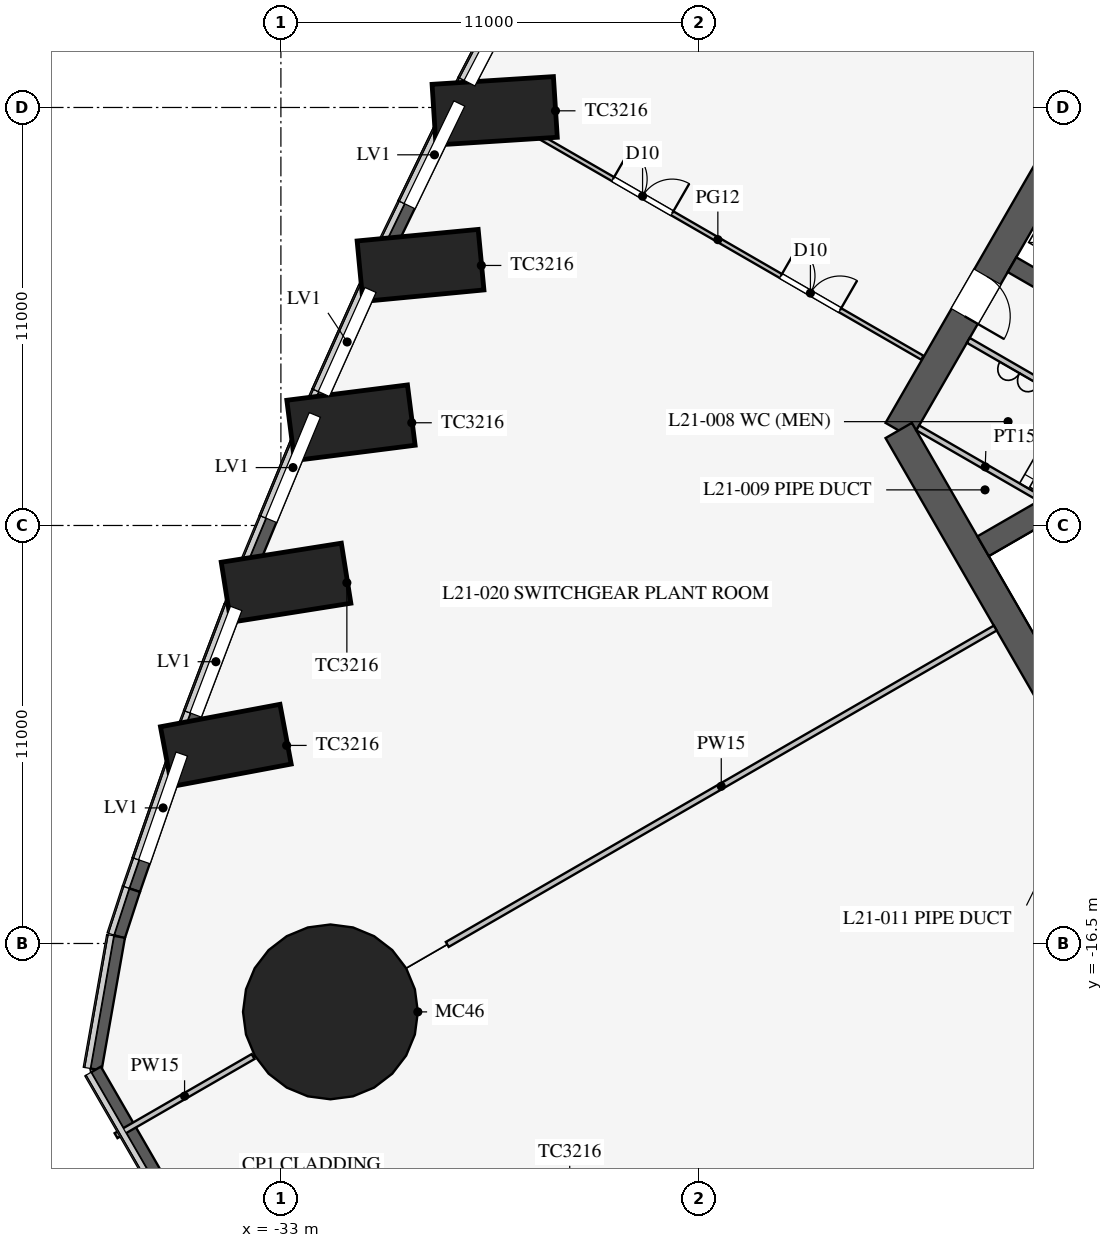
"""IFC4 building model, lengths in metres.
Left out: names, types, materials, properties, quantities, classifications, styles, units other than length and angle.
Written with IfcOpenShell. Run it as: python <this file> out.ifc"""

import sys

from ifc_helpers import new_model, si_unit, direction, frame, frame_2d, origin, origin_2d, place, context, subcontext, project, spatial, polyline, rectangle, circle, outline, extrude, clip, halfspace, element, fill, save


model = new_model("IFC4")
c1 = context("Model", 3, precision=1e-05, world=origin(), true_north=direction((0.0, 1.0)))
c2 = subcontext(c1, "Body", "Model", "MODEL_VIEW")
j1 = project(units=[si_unit("LENGTHUNIT", "METRE"), si_unit("PLANEANGLEUNIT", "RADIAN")], contexts=[c1])
p1 = place(None, origin())
s1 = spatial("IfcSite", under=j1, at=p1, CompositionType="ELEMENT")
p2 = place(p1, origin())
s2 = spatial("IfcBuilding", under=s1, at=p2, CompositionType="ELEMENT")
p3 = place(p2, frame((0.0, 0.0, 92.1)))
s3 = spatial("IfcBuildingStorey", under=s2, at=p3, CompositionType="ELEMENT", Elevation=92.1)
p4 = place(p3, frame((-27.0, -24.568, 0.0), z_axis=(0.0, 0.30053695487, 0.953770170826), x_axis=(0.982838110914, -0.175942156194, 0.055440106509)))
e1 = element("IfcColumn", 1, at=p4, inside=s3, PredefinedType="COLUMN", context=c2, shape_type="Clipping", body=[
    clip(clip(extrude(rectangle(XDim=3.2, YDim=1.6, at=origin_2d()), origin(), (0.0, 0.0, 1.0), 6.291), halfspace(frame((0.0, 0.0, 0.342), z_axis=(-3.2847543766298393e-06, 1.7500832742156636e-05, 0.9999999998414657), x_axis=(0.0, 0.9999999998468605, -1.750083274225105e-05)), True)), halfspace(frame((0.0, 0.0, 5.949), z_axis=(3.2847543766298393e-06, -1.7500832742156636e-05, -0.9999999998414657), x_axis=(0.0, -0.9999999998468605, 1.750083274225105e-05)), True)),
])
p5 = place(p3, frame((-27.611, 5.549, 0.0), z_axis=(0.191886340443, -0.110783015409, 0.975144479474), x_axis=(-0.445390477365, -0.895226011395, -0.014060981253)))
e2 = element("IfcColumn", 2, at=p5, inside=s3, PredefinedType="COLUMN", context=c2, shape_type="Clipping", body=[
    clip(clip(extrude(rectangle(XDim=3.2, YDim=1.6, at=origin_2d()), origin(), (0.0, 0.0, 1.0), 6.153), halfspace(frame((0.0, 0.0, 0.205), z_axis=(8.069350751413462e-07, -2.2984768012629386e-05, 0.9999999997355247), x_axis=(0.0, 0.9999999997358503, 2.298476801263687e-05)), True)), halfspace(frame((0.0, 0.0, 5.947), z_axis=(-8.069350751413462e-07, 2.2984768012629386e-05, -0.9999999997355247), x_axis=(0.0, -0.9999999997358503, -2.298476801263687e-05)), True)),
])
p6 = place(p3, frame((-29.576, 1.487, 0.0), z_axis=(0.20262976704, -0.116980910023, 0.972243099332), x_axis=(-0.417791222298, -0.908271551682, -0.022209974679)))
e3 = element("IfcColumn", 3, at=p6, inside=s3, PredefinedType="COLUMN", context=c2, shape_type="Clipping", body=[
    clip(clip(extrude(rectangle(XDim=3.2, YDim=1.6, at=origin_2d()), origin(), (0.0, 0.0, 1.0), 6.171), halfspace(frame((-0.0, 0.0, 0.229), z_axis=(6.181182433073058e-06, -3.065069579338831e-06, 0.9999999999761991), x_axis=(0.0, 0.9999999999953028, 3.0650695793973846e-06)), True)), halfspace(frame((0.0, 0.0, 5.942), z_axis=(-6.181182433073058e-06, 3.065069579338831e-06, -0.9999999999761991), x_axis=(0.0, -0.9999999999953028, -3.0650695793973846e-06)), True)),
])
p7 = place(p3, frame((-31.426, -2.641, 0.0), z_axis=(0.217636836674, -0.125674836379, 0.967904976133), x_axis=(-0.390430392584, -0.920087338943, -0.031676446499)))
e4 = element("IfcColumn", 4, at=p7, inside=s3, PredefinedType="COLUMN", context=c2, shape_type="Clipping", body=[
    clip(clip(extrude(rectangle(XDim=3.2, YDim=1.6, at=origin_2d()), origin(), (0.0, 0.0, 1.0), 6.199), halfspace(frame((0.0, 0.0, 0.259), z_axis=(-1.6119245002534085e-05, 2.5335897412520618e-05, 0.9999999995491311), x_axis=(0.0, 0.9999999996790462, -2.5335897415812134e-05)), True)), halfspace(frame((0.0, 0.0, 5.939), z_axis=(1.6119245002534085e-05, -2.5335897412520618e-05, -0.9999999995491311), x_axis=(0.0, -0.9999999996790462, 2.5335897415812134e-05)), True)),
])
p8 = place(p3, frame((-33.16, -6.836, 0.0), z_axis=(0.236939319597, -0.136786078955, 0.961846831586), x_axis=(-0.363310131171, -0.930682021103, -0.042857020249)))
e5 = element("IfcColumn", 5, at=p8, inside=s3, PredefinedType="COLUMN", context=c2, shape_type="Clipping", body=[
    clip(clip(extrude(rectangle(XDim=3.2, YDim=1.6, at=origin_2d()), origin(), (0.0, 0.0, 1.0), 6.238), halfspace(frame((0.0, 0.0, 0.297), z_axis=(1.1830986778905983e-05, 1.4324303993784593e-05, 0.9999999998274212), x_axis=(0.0, 0.9999999998974072, -1.4324303994787094e-05)), True)), halfspace(frame((0.0, 0.0, 5.941), z_axis=(-1.1830986778905983e-05, -1.4324303993784593e-05, -0.9999999998274212), x_axis=(0.0, -0.9999999998974072, 1.4324303994787094e-05)), True)),
])
p9 = place(p3, frame((-34.776, -11.099, 0.0), z_axis=(0.260253003307, -0.150307169968, 0.953769431742), x_axis=(-0.339184179186, -0.939084894567, -0.055440539186)))
e6 = element("IfcColumn", 6, at=p9, inside=s3, PredefinedType="COLUMN", context=c2, shape_type="Clipping", body=[
    clip(clip(extrude(rectangle(XDim=3.2, YDim=1.6, at=origin_2d()), origin(), (0.0, 0.0, 1.0), 6.291), halfspace(frame((0.0, 0.0, 0.342), z_axis=(-3.97536991854075e-05, 2.3073170005383226e-05, 0.9999999989436362), x_axis=(0.0, 0.9999999997338145, -2.3073170023615142e-05)), True)), halfspace(frame((-0.0, 0.0, 5.949), z_axis=(3.97536991854075e-05, -2.3073170005383226e-05, -0.9999999989436362), x_axis=(0.0, -0.9999999997338145, 2.3073170023615142e-05)), True)),
])
p10 = place(p3, frame((-32.043, -18.5, 0.0), z_axis=(0.273879842323, 0.158113013975, 0.948678083852), x_axis=(-0.499972520799, 0.866041268327, 0.0)))
e7 = element("IfcColumn", 7, at=p10, inside=s3, PredefinedType="COLUMN", context=c2, shape_type="Clipping", body=[
    clip(clip(extrude(circle(Radius=2.3, at=origin_2d()), origin(), (0.0, 0.0, 1.0), 6.325), halfspace(frame((0.0, 0.0, 0.768), z_axis=(1.0033762616878938e-05, 1.6488271940395816e-05, 0.9999999998137303), x_axis=(0.0, 0.9999999998640685, -1.6488271941225806e-05)), True)), halfspace(frame((0.0, 0.0, 5.557), z_axis=(-1.0033762616878938e-05, -1.6488271940395816e-05, -0.9999999998137303), x_axis=(0.0, -0.9999999998640685, 1.6488271941225806e-05)), True)),
])
p11 = place(p3, frame((-5.773, 16.0, 0.0), z_axis=(0.0, 0.0, 1.0), x_axis=(-0.500002442456, -0.866023993627, 0.0)))
e8 = element("IfcWall", 8, at=p11, inside=s3, PredefinedType="SHEAR", context=c2, shape_type="SweptSolid", body=[
    extrude(rectangle(XDim=21.939, YDim=0.8, at=frame_2d((10.97, 0.0))), origin(), (0.0, 0.0, 1.0), 6.0),
])
p12 = place(p11, frame((17.27, 0.0, 0.0)))
e9 = element("IfcOpeningElement", 9, at=p12, cuts=e8, PredefinedType="OPENING", context=c2, shape_type="SweptSolid", body=[
    extrude(rectangle(XDim=1.2, YDim=2.1, at=frame_2d((0.6, 1.05))), frame((0.0, 0.41, 0.0), z_axis=(0.0, -1.0, 0.0), x_axis=(1.0, 0.0, 0.0)), (0.0, 0.0, 1.0), 0.82),
])
p13 = place(p11, frame((3.47, 0.0, 0.0)))
e10 = element("IfcOpeningElement", 10, at=p13, cuts=e8, PredefinedType="OPENING", context=c2, shape_type="SweptSolid", body=[
    extrude(rectangle(XDim=1.2, YDim=2.1, at=frame_2d((0.6, 1.05))), frame((0.0, 0.41, 0.0), z_axis=(0.0, -1.0, 0.0), x_axis=(1.0, 0.0, 0.0)), (0.0, 0.0, 1.0), 0.82),
])
p14 = place(p3, frame((-16.743, -3.0, 0.0), z_axis=(0.0, 0.0, 1.0), x_axis=(0.499995765644, -0.866027848477, 0.0)))
e11 = element("IfcWall", 11, at=p14, inside=s3, PredefinedType="SHEAR", context=c2, shape_type="SweptSolid", body=[
    extrude(rectangle(XDim=11.547, YDim=0.8, at=frame_2d((5.773, 0.0))), origin(), (0.0, 0.0, 1.0), 6.0),
])
p15 = place(p3, frame((-11.532, 0.076, 0.0), z_axis=(0.0, 0.0, 1.0), x_axis=(-0.866005588531, 0.500034319456, 0.0)))
e12 = element("IfcWall", 12, at=p15, inside=s3, PredefinedType="SHEAR", context=c2, shape_type="SweptSolid", body=[
    extrude(rectangle(XDim=2.575, YDim=0.45, at=frame_2d((1.288, 0.0))), origin(), (0.0, 0.0, 1.0), 6.0),
])
p16 = place(p3, frame((-6.663, -1.509, 0.0), z_axis=(0.0, 0.0, 1.0), x_axis=(-0.866019375473, -0.500010441196, 0.0)))
e13 = element("IfcWall", 13, at=p16, inside=s3, PredefinedType="SHEAR", context=c2, shape_type="SweptSolid", body=[
    extrude(rectangle(XDim=9.075, YDim=0.6, at=frame_2d((4.538, 0.0))), origin(), (0.0, 0.0, 1.0), 6.0),
])
p17 = place(p3, frame((-26.095, 9.87, 0.0), z_axis=(0.0, 0.0, 1.0), x_axis=(-0.461810056307, -0.886978845235, 0.0)))
e14 = element("IfcWall", 14, at=p17, inside=s3, PredefinedType="SOLIDWALL", context=c2, shape_type="SweptSolid", body=[
    extrude(rectangle(XDim=4.504, YDim=0.3, at=frame_2d((2.252, 0.0))), origin(), (0.0, 0.0, 1.0), 5.8),
])
p18 = place(p17, frame((1.204, 0.0, 3.5)))
e15 = element("IfcOpeningElement", 15, at=p18, cuts=e14, PredefinedType="OPENING", context=c2, shape_type="SweptSolid", body=[
    extrude(rectangle(XDim=3.0, YDim=2.0, at=frame_2d((1.5, 1.0))), frame((0.0, 0.16, 0.0), z_axis=(0.0, -1.0, 0.0), x_axis=(1.0, 0.0, 0.0)), (0.0, 0.0, 1.0), 0.32),
])
p19 = place(p3, frame((-28.175, 5.875, 0.0), z_axis=(0.0, 0.0, 1.0), x_axis=(-0.435857917556, -0.900015486369, 0.0)))
e16 = element("IfcWall", 16, at=p19, inside=s3, PredefinedType="SOLIDWALL", context=c2, shape_type="SweptSolid", body=[
    extrude(rectangle(XDim=4.512, YDim=0.3, at=frame_2d((2.256, 0.0))), origin(), (0.0, 0.0, 1.0), 5.8),
])
p20 = place(p19, frame((0.3, 0.0, 3.5)))
e17 = element("IfcOpeningElement", 17, at=p20, cuts=e16, PredefinedType="OPENING", context=c2, shape_type="SweptSolid", body=[
    extrude(rectangle(XDim=3.0, YDim=2.0, at=frame_2d((1.5, 1.0))), frame((0.0, 0.16, 0.0), z_axis=(0.0, -1.0, 0.0), x_axis=(1.0, 0.0, 0.0)), (0.0, 0.0, 1.0), 0.32),
])
p21 = place(p3, frame((-30.141, 1.814, 0.0), z_axis=(0.0, 0.0, 1.0), x_axis=(-0.409430894151, -0.912341132973, 0.0)))
e18 = element("IfcWall", 18, at=p21, inside=s3, PredefinedType="SOLIDWALL", context=c2, shape_type="SweptSolid", body=[
    extrude(rectangle(XDim=4.523, YDim=0.3, at=frame_2d((2.262, 0.0))), origin(), (0.0, 0.0, 1.0), 5.8),
])
p22 = place(p21, frame((1.223, 0.0, 3.5)))
e19 = element("IfcOpeningElement", 19, at=p22, cuts=e18, PredefinedType="OPENING", context=c2, shape_type="SweptSolid", body=[
    extrude(rectangle(XDim=3.0, YDim=2.0, at=frame_2d((1.5, 1.0))), frame((0.0, 0.16, 0.0), z_axis=(0.0, -1.0, 0.0), x_axis=(1.0, 0.0, 0.0)), (0.0, 0.0, 1.0), 0.32),
])
p23 = place(p3, frame((-31.993, -2.313, 0.0), z_axis=(0.0, 0.0, 1.0), x_axis=(-0.38265900014, -0.923889652292, 0.0)))
e20 = element("IfcWall", 20, at=p23, inside=s3, PredefinedType="SOLIDWALL", context=c2, shape_type="SweptSolid", body=[
    extrude(rectangle(XDim=4.539, YDim=0.3, at=frame_2d((2.27, 0.0))), origin(), (0.0, 0.0, 1.0), 5.8),
])
p24 = place(p23, frame((0.3, 0.0, 3.5)))
e21 = element("IfcOpeningElement", 21, at=p24, cuts=e20, PredefinedType="OPENING", context=c2, shape_type="SweptSolid", body=[
    extrude(rectangle(XDim=3.0, YDim=2.0, at=frame_2d((1.5, 1.0))), frame((0.0, 0.16, 0.0), z_axis=(0.0, -1.0, 0.0), x_axis=(1.0, 0.0, 0.0)), (0.0, 0.0, 1.0), 0.32),
])
p25 = place(p3, frame((-33.73, -6.507, 0.0), z_axis=(0.0, 0.0, 1.0), x_axis=(-0.355351603025, -0.93473270951, 0.0)))
e22 = element("IfcWall", 22, at=p25, inside=s3, PredefinedType="SOLIDWALL", context=c2, shape_type="SweptSolid", body=[
    extrude(rectangle(XDim=4.559, YDim=0.3, at=frame_2d((2.279, 0.0))), origin(), (0.0, 0.0, 1.0), 5.8),
])
p26 = place(p25, frame((1.259, 0.0, 3.5)))
e23 = element("IfcOpeningElement", 23, at=p26, cuts=e22, PredefinedType="OPENING", context=c2, shape_type="SweptSolid", body=[
    extrude(rectangle(XDim=3.0, YDim=2.0, at=frame_2d((1.5, 1.0))), frame((0.0, 0.16, 0.0), z_axis=(0.0, -1.0, 0.0), x_axis=(1.0, 0.0, 0.0)), (0.0, 0.0, 1.0), 0.32),
])
p27 = place(p3, frame((-35.35, -10.768, 0.0), z_axis=(0.0, 0.0, 1.0), x_axis=(-0.327681468309, -0.94478825952, 0.0)))
e24 = element("IfcWall", 24, at=p27, inside=s3, PredefinedType="SOLIDWALL", context=c2, shape_type="SweptSolid", body=[
    extrude(rectangle(XDim=4.582, YDim=0.3, at=frame_2d((2.291, 0.0))), origin(), (0.0, 0.0, 1.0), 5.8),
])
p28 = place(p27, frame((0.791, 0.0, 3.5)))
e25 = element("IfcOpeningElement", 25, at=p28, cuts=e24, PredefinedType="OPENING", context=c2, shape_type="SweptSolid", body=[
    extrude(rectangle(XDim=3.0, YDim=2.0, at=frame_2d((1.5, 1.0))), frame((0.0, 0.16, 0.0), z_axis=(0.0, -1.0, 0.0), x_axis=(1.0, 0.0, 0.0)), (0.0, 0.0, 1.0), 0.32),
])
p29 = place(p3, frame((-36.852, -15.097, 0.0), z_axis=(0.0, 0.0, 1.0), x_axis=(-0.309693449929, -0.950836456532, 0.0)))
e26 = element("IfcWall", 26, at=p29, inside=s3, PredefinedType="SOLIDWALL", context=c2, shape_type="SweptSolid", body=[
    extrude(rectangle(XDim=1.291, YDim=0.3, at=frame_2d((0.645, 0.0))), origin(), (0.0, 0.0, 1.0), 5.8),
])
for number, where, z_axis, x_axis in (
    (27, (-37.251, -16.324, 0.0), (0.0, 0.0, 1.0), (-0.174, -0.985, 0.0)),
    (28, (-37.867, -19.815, 0.0), (0.0, 0.0, 1.0), (0.5, -0.866, 0.0)),
):
    element("IfcWall", number, at=place(p3, frame(where, z_axis=z_axis, x_axis=x_axis)), inside=s3, PredefinedType="SOLIDWALL", context=c2, shape_type="SweptSolid", body=[
        extrude(rectangle(XDim=3.546, YDim=0.3, at=frame_2d((1.773, 0.0))), origin(), (0.0, 0.0, 1.0), 5.8),
    ])
p30 = place(p3, frame((-10.495, -3.178, 0.0), z_axis=(0.0, 0.0, 1.0), x_axis=(-0.86602216432, 0.500005610874, 0.0)))
e29 = element("IfcWall", 29, at=p30, inside=s3, PredefinedType="PARTITIONING", context=c2, shape_type="SweptSolid", body=[
    extrude(rectangle(XDim=5.1, YDim=0.15, at=frame_2d((2.55, 0.0))), origin(), (0.0, 0.0, 1.0), 5.8),
])
p31 = place(p30, frame((1.3, 0.0, 0.0)))
e30 = element("IfcOpeningElement", 30, at=p31, cuts=e29, PredefinedType="OPENING", context=c2, shape_type="SweptSolid", body=[
    extrude(rectangle(XDim=0.9, YDim=2.1, at=frame_2d((0.45, 1.05))), frame((0.0, 0.085, 0.0), z_axis=(0.0, -1.0, 0.0), x_axis=(1.0, 0.0, 0.0)), (0.0, 0.0, 1.0), 0.17),
])
p32 = place(p3, frame((-12.691, -4.982, 0.0), z_axis=(0.0, 0.0, 1.0), x_axis=(-0.8660249478, 0.500000789788, 0.0)))
e31 = element("IfcWall", 31, at=p32, inside=s3, PredefinedType="PARTITIONING", context=c2, shape_type="SweptSolid", body=[
    extrude(rectangle(XDim=4.1, YDim=0.15, at=frame_2d((2.05, 0.0))), origin(), (0.0, 0.0, 1.0), 5.8),
])
p33 = place(p3, frame((-14.203, -8.2, 0.0), z_axis=(0.0, 0.0, 1.0), x_axis=(-0.866024668836, -0.500001272966, 0.0)))
e32 = element("IfcWall", 32, at=p33, inside=s3, PredefinedType="PARTITIONING", context=c2, shape_type="SweptSolid", body=[
    extrude(rectangle(XDim=16.65, YDim=0.15, at=frame_2d((8.325, 0.0))), origin(), (0.0, 0.0, 1.0), 4.1),
])
p34 = place(p3, frame((-33.732, -19.475, 0.0), z_axis=(0.0, 0.0, 1.0), x_axis=(-0.866026440262, -0.499998204763, 0.0)))
e33 = element("IfcWall", 33, at=p34, inside=s3, PredefinedType="PARTITIONING", context=c2, shape_type="SweptSolid", body=[
    extrude(rectangle(XDim=4.164, YDim=0.15, at=frame_2d((2.082, 0.0))), origin(), (0.0, 0.0, 1.0), 4.1),
])
p35 = place(p3, frame((-26.316, 4.802, 0.0), z_axis=(0.0, 0.0, 1.0), x_axis=(-0.866073599808, 0.499916512745, 0.0)))
e34 = element("IfcWall", 34, at=p35, inside=s3, PredefinedType="PARTITIONING", context=c2, shape_type="SweptSolid", body=[
    extrude(outline(polyline([(0.0, 0.0), (0.653, 0.0), (0.653, 0.05), (0.0, 2.9), (0.0, 0.0)])), frame((0.0, 0.06, 0.0), z_axis=(0.0, -1.0, 0.0), x_axis=(1.0, 0.0, 0.0)), (0.0, 0.0, 1.0), 0.12),
])
p36 = place(p3, frame((-16.122, -1.084, 0.0), z_axis=(0.0, 0.0, 1.0), x_axis=(-0.866023947468, 0.500002522405, 0.0)))
e35 = element("IfcWall", 35, at=p36, inside=s3, PredefinedType="PARTITIONING", context=c2, shape_type="SweptSolid", body=[
    extrude(rectangle(XDim=11.771, YDim=0.12, at=frame_2d((5.886, 0.0))), origin(), (0.0, 0.0, 1.0), 2.9),
])
p37 = place(p36, frame((2.5, 0.0, 0.0)))
e36 = element("IfcOpeningElement", 36, at=p37, cuts=e35, PredefinedType="OPENING", context=c2, shape_type="SweptSolid", body=[
    extrude(rectangle(XDim=1.8, YDim=2.1, at=frame_2d((0.9, 1.05))), frame((0.0, 0.07, 0.0), z_axis=(0.0, -1.0, 0.0), x_axis=(1.0, 0.0, 0.0)), (0.0, 0.0, 1.0), 0.14),
])
p38 = place(p36, frame((7.6, 0.0, 0.0)))
e37 = element("IfcOpeningElement", 37, at=p38, cuts=e35, PredefinedType="OPENING", context=c2, shape_type="SweptSolid", body=[
    extrude(rectangle(XDim=1.8, YDim=2.1, at=frame_2d((0.9, 1.05))), frame((0.0, 0.07, 0.0), z_axis=(0.0, -1.0, 0.0), x_axis=(1.0, 0.0, 0.0)), (0.0, 0.0, 1.0), 0.14),
])
p39 = place(p18, origin())
e38 = element("IfcWindow", 38, at=p39, inside=s3, PartitioningType="SINGLE_PANEL", PredefinedType="USERDEFINED", context=c2, shape_type="SweptSolid", body=[
    extrude(rectangle(XDim=3.0, YDim=2.0, at=frame_2d((1.5, 1.0))), frame((0.0, 0.03, 0.0), z_axis=(0.0, -1.0, 0.0), x_axis=(1.0, 0.0, 0.0)), (0.0, 0.0, 1.0), 0.06),
])
fill(e15, e38)
p40 = place(p20, origin())
e39 = element("IfcWindow", 39, at=p40, inside=s3, PartitioningType="SINGLE_PANEL", PredefinedType="USERDEFINED", context=c2, shape_type="SweptSolid", body=[
    extrude(rectangle(XDim=3.0, YDim=2.0, at=frame_2d((1.5, 1.0))), frame((0.0, 0.03, 0.0), z_axis=(0.0, -1.0, 0.0), x_axis=(1.0, 0.0, 0.0)), (0.0, 0.0, 1.0), 0.06),
])
fill(e17, e39)
p41 = place(p22, origin())
e40 = element("IfcWindow", 40, at=p41, inside=s3, PartitioningType="SINGLE_PANEL", PredefinedType="USERDEFINED", context=c2, shape_type="SweptSolid", body=[
    extrude(rectangle(XDim=3.0, YDim=2.0, at=frame_2d((1.5, 1.0))), frame((0.0, 0.03, 0.0), z_axis=(0.0, -1.0, 0.0), x_axis=(1.0, 0.0, 0.0)), (0.0, 0.0, 1.0), 0.06),
])
fill(e19, e40)
p42 = place(p24, origin())
e41 = element("IfcWindow", 41, at=p42, inside=s3, PartitioningType="SINGLE_PANEL", PredefinedType="USERDEFINED", context=c2, shape_type="SweptSolid", body=[
    extrude(rectangle(XDim=3.0, YDim=2.0, at=frame_2d((1.5, 1.0))), frame((0.0, 0.03, 0.0), z_axis=(0.0, -1.0, 0.0), x_axis=(1.0, 0.0, 0.0)), (0.0, 0.0, 1.0), 0.06),
])
fill(e21, e41)
p43 = place(p26, origin())
e42 = element("IfcWindow", 42, at=p43, inside=s3, PartitioningType="SINGLE_PANEL", PredefinedType="USERDEFINED", context=c2, shape_type="SweptSolid", body=[
    extrude(rectangle(XDim=3.0, YDim=2.0, at=frame_2d((1.5, 1.0))), frame((0.0, 0.03, 0.0), z_axis=(0.0, -1.0, 0.0), x_axis=(1.0, 0.0, 0.0)), (0.0, 0.0, 1.0), 0.06),
])
fill(e23, e42)
p44 = place(p28, origin())
e43 = element("IfcWindow", 43, at=p44, inside=s3, PartitioningType="SINGLE_PANEL", PredefinedType="USERDEFINED", context=c2, shape_type="SweptSolid", body=[
    extrude(rectangle(XDim=3.0, YDim=2.0, at=frame_2d((1.5, 1.0))), frame((0.0, 0.03, 0.0), z_axis=(0.0, -1.0, 0.0), x_axis=(1.0, 0.0, 0.0)), (0.0, 0.0, 1.0), 0.06),
])
fill(e25, e43)
p45 = place(p12, origin())
e44 = element("IfcDoor", 44, at=p45, inside=s3, OperationType="SINGLE_SWING_RIGHT", PredefinedType="DOOR", context=c2, shape_type="SweptSolid", body=[
    extrude(rectangle(XDim=1.2, YDim=2.1, at=frame_2d((0.6, 1.05))), frame((0.0, 0.025, 0.0), z_axis=(0.0, -1.0, 0.0), x_axis=(1.0, 0.0, 0.0)), (0.0, 0.0, 1.0), 0.05),
])
fill(e9, e44)
p46 = place(p37, frame((1.8, 0.0, 0.0), z_axis=(0.0, 0.0, 1.0), x_axis=(-1.0, 0.0, 0.0)))
e45 = element("IfcDoor", 45, at=p46, inside=s3, OperationType="DOUBLE_DOOR_SINGLE_SWING", PredefinedType="DOOR", context=c2, shape_type="SweptSolid", body=[
    extrude(rectangle(XDim=1.8, YDim=2.1, at=frame_2d((0.9, 1.05))), frame((0.0, 0.025, 0.0), z_axis=(0.0, -1.0, 0.0), x_axis=(1.0, 0.0, 0.0)), (0.0, 0.0, 1.0), 0.05),
])
fill(e36, e45)
p47 = place(p38, frame((1.8, 0.0, 0.0), z_axis=(0.0, 0.0, 1.0), x_axis=(-1.0, 0.0, 0.0)))
e46 = element("IfcDoor", 46, at=p47, inside=s3, OperationType="DOUBLE_DOOR_SINGLE_SWING", PredefinedType="DOOR", context=c2, shape_type="SweptSolid", body=[
    extrude(rectangle(XDim=1.8, YDim=2.1, at=frame_2d((0.9, 1.05))), frame((0.0, 0.025, 0.0), z_axis=(0.0, -1.0, 0.0), x_axis=(1.0, 0.0, 0.0)), (0.0, 0.0, 1.0), 0.05),
])
fill(e37, e46)
save(model, sys.argv[1])
